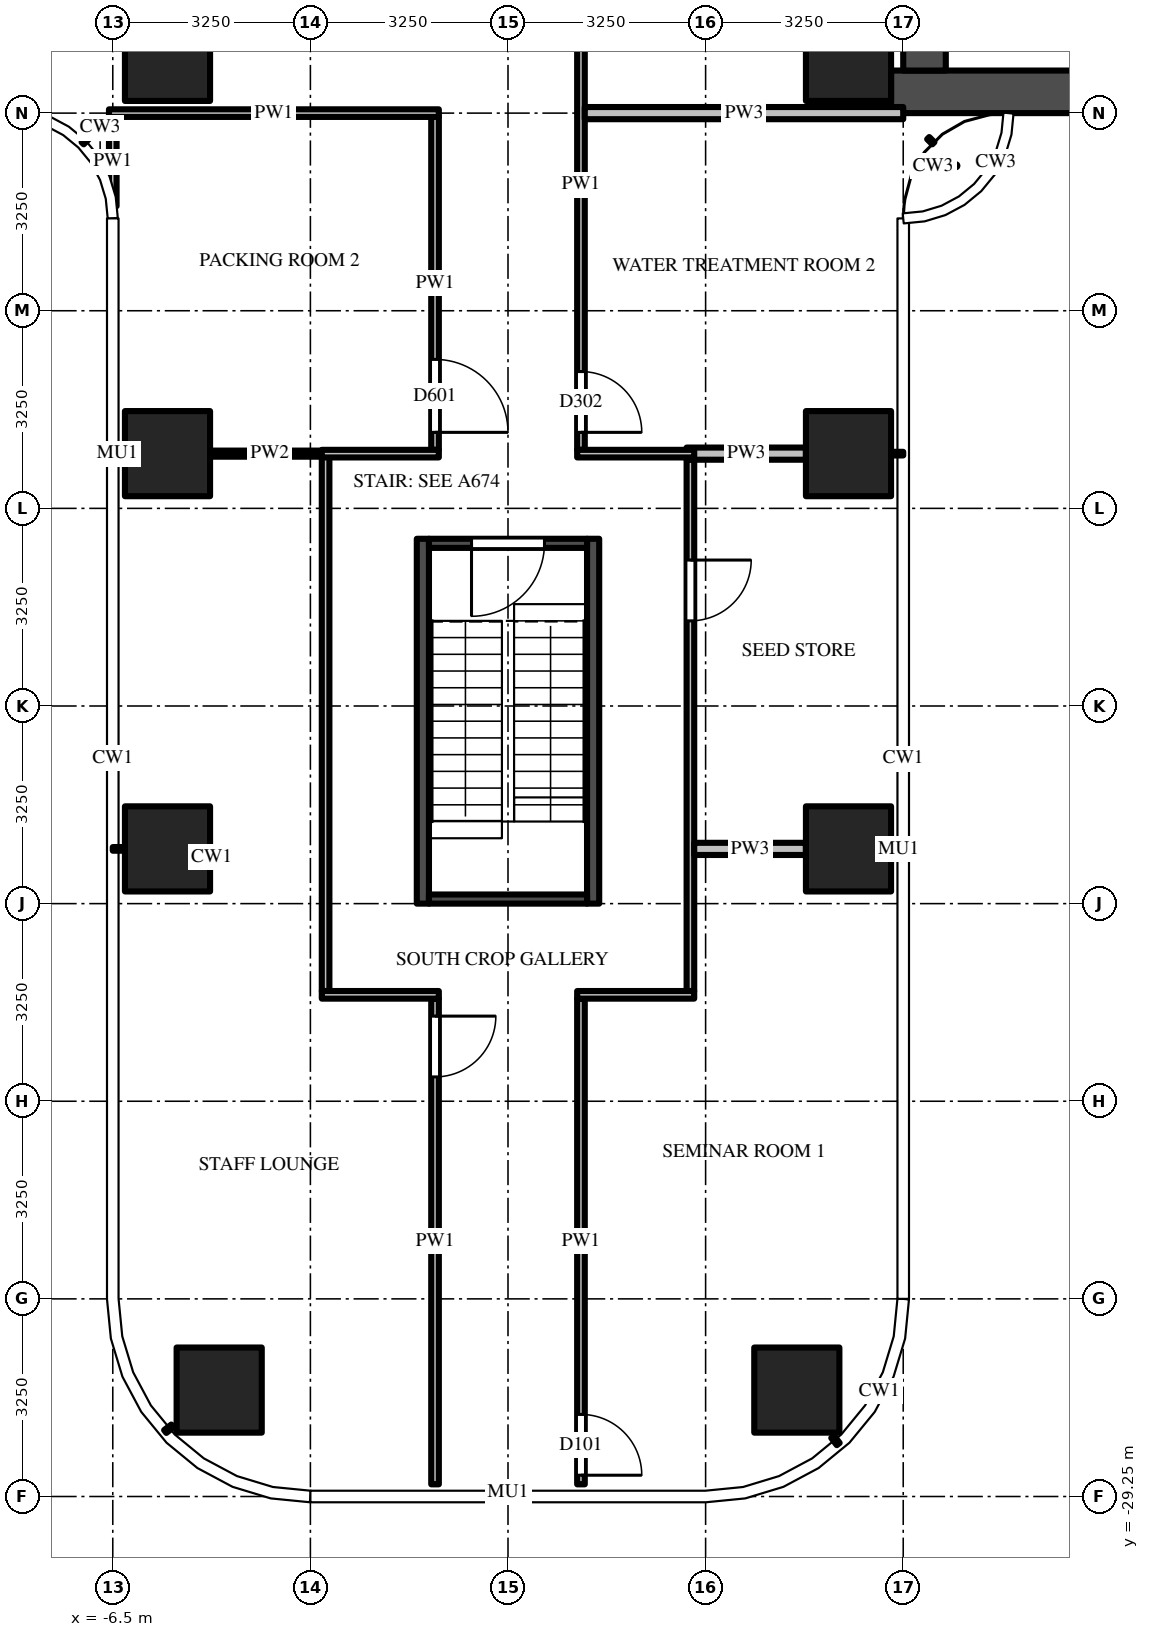
"""IFC4 building model, lengths in metres.
Left out: names, types, materials, properties, quantities, classifications, styles, units other than length and angle.
Written with IfcOpenShell. Run it as: python <this file> out.ifc"""

import sys

from ifc_helpers import new_model, si_unit, direction, frame, frame_2d, origin, origin_2d, place, context, subcontext, project, spatial, polyline, rectangle, outline, extrude, source, transform, mapped, element, fill, save


model = new_model("IFC4")
c1 = context("Model", 3, precision=1e-05, world=origin(), true_north=direction((0.0, 1.0)))
c2 = subcontext(c1, "Body", "Model", "MODEL_VIEW")
j1 = project(units=[si_unit("LENGTHUNIT", "METRE"), si_unit("PLANEANGLEUNIT", "RADIAN")], contexts=[c1])
p1 = place(None, origin())
s1 = spatial("IfcSite", under=j1, at=p1, CompositionType="ELEMENT")
p2 = place(p1, origin())
s2 = spatial("IfcBuilding", under=s1, at=p2, CompositionType="ELEMENT")
p3 = place(p2, frame((0.0, 0.0, 83.5)))
s3 = spatial("IfcBuildingStorey", under=s2, at=p3, CompositionType="ELEMENT", Elevation=83.5)
m1 = source(origin(), c2, "Body", "SweptSolid", [
    extrude(rectangle(XDim=1.4, YDim=1.4, at=origin_2d()), origin(), (0.0, 0.0, 1.0), 4.5),
])
for number, where, z_axis, x_axis in (
    (1, (5.6, -5.6, 0.0), (0.0, 0.0, 1.0), (1.0, 0.0, 0.0)),
    (2, (-5.6, -5.6, 0.0), (0.0, 0.0, 1.0), (1.0, 0.0, 0.0)),
    (3, (5.6, -12.1, 0.0), (0.0, 0.0, 1.0), (1.0, 0.0, 0.0)),
    (4, (5.6, -18.6, 0.0), (0.0, 0.0, 1.0), (1.0, 0.0, 0.0)),
    (5, (4.75, -27.5, 0.0), (0.0, 0.0, 1.0), (1.0, 0.0, 0.0)),
    (6, (-5.6, -12.1, 0.0), (0.0, 0.0, 1.0), (1.0, 0.0, 0.0)),
    (7, (-5.6, -18.6, 0.0), (0.0, 0.0, 1.0), (1.0, 0.0, 0.0)),
    (8, (-4.75, -27.5, 0.0), (0.0, 0.0, 1.0), (1.0, 0.0, 0.0)),
):
    element("IfcColumn", number, at=place(p3, frame(where, z_axis=z_axis, x_axis=x_axis)), inside=s3, PredefinedType="COLUMN", context=c2, shape_type="MappedRepresentation", body=[
        mapped(m1, transform((0.0, 0.0, 0.0))),
    ])
m2 = source(origin(), c2, "Body", "SweptSolid", [
    extrude(rectangle(XDim=16.45, YDim=0.7, at=frame_2d((8.225, 0.0))), origin(), (0.0, 0.0, 1.0), 4.25),
])
p4 = place(p3, frame((6.3, -6.15, 0.0), z_axis=(0.0, 0.0, 1.0), x_axis=(1.0, 0.0, 0.0)))
e9 = element("IfcWall", 9, at=p4, inside=s3, PredefinedType="SHEAR", context=c2, shape_type="MappedRepresentation", body=[
    mapped(m2, transform((0.0, 0.0, 0.0))),
])
m3 = source(origin(), c2, "Body", "SweptSolid", [
    extrude(rectangle(XDim=9.05, YDim=0.7, at=frame_2d((4.525, 0.0))), origin(), (0.0, 0.0, 1.0), 4.25),
])
p5 = place(p3, frame((6.85, -5.8, 0.0), z_axis=(0.0, 0.0, 1.0), x_axis=(0.0, 1.0, 0.0)))
e10 = element("IfcWall", 10, at=p5, inside=s3, PredefinedType="SHEAR", context=c2, shape_type="MappedRepresentation", body=[
    mapped(m3, transform((0.0, 0.0, 0.0))),
])
m4 = source(origin(), c2, "Body", "SweptSolid", [
    extrude(rectangle(XDim=1.8, YDim=2.1, at=frame_2d((0.9, 1.05))), frame((0.0, 0.36, 0.0), z_axis=(0.0, -1.0, 0.0), x_axis=(1.0, 0.0, 0.0)), (0.0, 0.0, 1.0), 0.72),
])
p6 = place(p5, frame((3.15, 0.0, 0.0)))
e11 = element("IfcOpeningElement", 11, at=p6, cuts=e10, PredefinedType="OPENING", context=c2, shape_type="MappedRepresentation", body=[
    mapped(m4, transform((0.0, 0.0, 0.0))),
])
m5 = source(origin(), c2, "Body", "SweptSolid", [
    extrude(rectangle(XDim=6.0, YDim=0.2, at=frame_2d((3.0, 0.0))), origin(), (0.0, 0.0, 1.0), 4.25),
])
for number, where, z_axis, x_axis in (
    (12, (1.4, -13.5, 0.0), (0.0, 0.0, 1.0), (0.0, -1.0, 0.0)),
    (13, (-1.4, -13.5, 0.0), (0.0, 0.0, 1.0), (0.0, -1.0, 0.0)),
):
    element("IfcWall", number, at=place(p3, frame(where, z_axis=z_axis, x_axis=x_axis)), inside=s3, PredefinedType="SHEAR", context=c2, shape_type="MappedRepresentation", body=[
        mapped(m5, transform((0.0, 0.0, 0.0))),
    ])
m6 = source(origin(), c2, "Body", "SweptSolid", [
    extrude(rectangle(XDim=2.6, YDim=0.15, at=frame_2d((1.3, 0.0))), origin(), (0.0, 0.0, 1.0), 4.25),
])
p7 = place(p3, frame((1.3, -13.575, 0.0), z_axis=(0.0, 0.0, 1.0), x_axis=(-1.0, 0.0, 0.0)))
e14 = element("IfcWall", 14, at=p7, inside=s3, PredefinedType="SHEAR", context=c2, shape_type="MappedRepresentation", body=[
    mapped(m6, transform((0.0, 0.0, 0.0))),
])
m7 = source(origin(), c2, "Body", "SweptSolid", [
    extrude(rectangle(XDim=1.2, YDim=2.1, at=frame_2d((0.6, 1.05))), frame((0.0, 0.085, 0.0), z_axis=(0.0, -1.0, 0.0), x_axis=(1.0, 0.0, 0.0)), (0.0, 0.0, 1.0), 0.17),
])
p8 = place(p7, frame((0.7, 0.0, 0.0)))
e15 = element("IfcOpeningElement", 15, at=p8, cuts=e14, PredefinedType="OPENING", context=c2, shape_type="MappedRepresentation", body=[
    mapped(m7, transform((0.0, 0.0, 0.0))),
])
p9 = place(p3, frame((1.3, -19.425, 0.0), z_axis=(0.0, 0.0, 1.0), x_axis=(-1.0, 0.0, 0.0)))
e16 = element("IfcWall", 16, at=p9, inside=s3, PredefinedType="SHEAR", context=c2, shape_type="MappedRepresentation", body=[
    mapped(m6, transform((0.0, 0.0, 0.0))),
])
p10 = place(p3, origin())
e17 = element("IfcWall", 17, at=p10, inside=s3, PredefinedType="USERDEFINED", context=c2, shape_type="SweptSolid", body=[
    extrude(outline(polyline([(8.602, -27.696), (8.025, -28.631), (7.514, -28.316), (8.028, -27.483), (8.233, -26.2), (8.104, -25.438), (8.696, -25.338), (8.841, -26.198), (8.602, -27.696)])), origin(), (0.0, 0.0, 1.0), 0.5),
])
m8 = source(origin(), c2, "Body", "SweptSolid", [
    extrude(rectangle(XDim=1.469, YDim=0.125, at=frame_2d((0.734, 0.0))), origin(), (0.0, 0.0, 1.0), 4.25),
])
p11 = place(p3, frame((-6.5, -6.562, 0.0), z_axis=(0.0, 0.0, 1.0), x_axis=(0.0, -1.0, 0.0)))
e18 = element("IfcWall", 18, at=p11, inside=s3, PredefinedType="PARTITIONING", context=c2, shape_type="MappedRepresentation", body=[
    mapped(m8, transform((0.0, 0.0, 0.0))),
])
m9 = source(origin(), c2, "Body", "SweptSolid", [
    extrude(rectangle(XDim=8.788, YDim=0.125, at=frame_2d((4.394, 0.0))), origin(), (0.0, 0.0, 1.0), 3.468),
])
p12 = place(p3, frame((-3.0, -20.938, 0.0), z_axis=(0.0, 0.0, 1.0), x_axis=(0.0, 1.0, 0.0)))
e19 = element("IfcWall", 19, at=p12, inside=s3, PredefinedType="PARTITIONING", context=c2, shape_type="MappedRepresentation", body=[
    mapped(m9, transform((0.0, 0.0, 0.0))),
])
m10 = source(origin(), c2, "Body", "SweptSolid", [
    extrude(rectangle(XDim=7.988, YDim=0.125, at=frame_2d((3.994, 0.0))), origin(), (0.0, 0.0, 1.0), 3.33),
])
p13 = place(p3, frame((-1.2, -21.062, 0.0), z_axis=(0.0, 0.0, 1.0), x_axis=(0.0, -1.0, 0.0)))
e20 = element("IfcWall", 20, at=p13, inside=s3, PredefinedType="PARTITIONING", context=c2, shape_type="MappedRepresentation", body=[
    mapped(m10, transform((0.0, 0.0, 0.0))),
])
m11 = source(origin(), c2, "Body", "SweptSolid", [
    extrude(rectangle(XDim=1.0, YDim=2.1, at=frame_2d((0.5, 1.05))), frame((0.0, 0.073, 0.0), z_axis=(0.0, -1.0, 0.0), x_axis=(1.0, 0.0, 0.0)), (0.0, 0.0, 1.0), 0.145),
])
p14 = place(p13, frame((0.288, 0.0, 0.0)))
e21 = element("IfcOpeningElement", 21, at=p14, cuts=e20, PredefinedType="OPENING", context=c2, shape_type="MappedRepresentation", body=[
    mapped(m11, transform((0.0, 0.0, 0.0))),
])
m12 = source(origin(), c2, "Body", "SweptSolid", [
    extrude(rectangle(XDim=5.475, YDim=0.125, at=frame_2d((2.738, 0.0))), origin(), (0.0, 0.0, 1.0), 3.468),
])
p15 = place(p3, frame((-1.2, -6.562, 0.0), z_axis=(0.0, 0.0, 1.0), x_axis=(0.0, -1.0, 0.0)))
e22 = element("IfcWall", 22, at=p15, inside=s3, PredefinedType="PARTITIONING", context=c2, shape_type="MappedRepresentation", body=[
    mapped(m12, transform((0.0, 0.0, 0.0))),
])
m13 = source(origin(), c2, "Body", "SweptSolid", [
    extrude(rectangle(XDim=1.2, YDim=2.1, at=frame_2d((0.6, 1.05))), frame((0.0, 0.073, 0.0), z_axis=(0.0, -1.0, 0.0), x_axis=(1.0, 0.0, 0.0)), (0.0, 0.0, 1.0), 0.145),
])
p16 = place(p15, frame((3.988, 0.0, 0.0)))
e23 = element("IfcOpeningElement", 23, at=p16, cuts=e22, PredefinedType="OPENING", context=c2, shape_type="MappedRepresentation", body=[
    mapped(m13, transform((0.0, 0.0, 0.0))),
])
p17 = place(p3, frame((1.2, -21.062, 0.0), z_axis=(0.0, 0.0, 1.0), x_axis=(0.0, -1.0, 0.0)))
e24 = element("IfcWall", 24, at=p17, inside=s3, PredefinedType="PARTITIONING", context=c2, shape_type="MappedRepresentation", body=[
    mapped(m10, transform((0.0, 0.0, 0.0))),
])
p18 = place(p17, frame((6.837, 0.0, 0.0)))
e25 = element("IfcOpeningElement", 25, at=p18, cuts=e24, PredefinedType="OPENING", context=c2, shape_type="MappedRepresentation", body=[
    mapped(m11, transform((0.0, 0.0, 0.0))),
])
m14 = source(origin(), c2, "Body", "SweptSolid", [
    extrude(rectangle(XDim=8.725, YDim=0.125, at=frame_2d((4.363, 0.0))), origin(), (0.0, 0.0, 1.0), 3.468),
])
p19 = place(p3, frame((1.2, -3.312, 0.0), z_axis=(0.0, 0.0, 1.0), x_axis=(0.0, -1.0, 0.0)))
e26 = element("IfcWall", 26, at=p19, inside=s3, PredefinedType="PARTITIONING", context=c2, shape_type="MappedRepresentation", body=[
    mapped(m14, transform((0.0, 0.0, 0.0))),
])
p20 = place(p19, frame((7.438, 0.0, 0.0)))
e27 = element("IfcOpeningElement", 27, at=p20, cuts=e26, PredefinedType="OPENING", context=c2, shape_type="MappedRepresentation", body=[
    mapped(m11, transform((0.0, 0.0, 0.0))),
])
m15 = source(origin(), c2, "Body", "SweptSolid", [
    extrude(rectangle(XDim=8.738, YDim=0.125, at=frame_2d((4.369, 0.0))), origin(), (0.0, 0.0, 1.0), 3.468),
])
p21 = place(p3, frame((3.0, -12.2, 0.0), z_axis=(0.0, 0.0, 1.0), x_axis=(0.0, -1.0, 0.0)))
e28 = element("IfcWall", 28, at=p21, inside=s3, PredefinedType="PARTITIONING", context=c2, shape_type="MappedRepresentation", body=[
    mapped(m15, transform((0.0, 0.0, 0.0))),
])
p22 = place(p21, frame((1.65, 0.0, 0.0)))
e29 = element("IfcOpeningElement", 29, at=p22, cuts=e28, PredefinedType="OPENING", context=c2, shape_type="MappedRepresentation", body=[
    mapped(m11, transform((0.0, 0.0, 0.0))),
])
m16 = source(origin(), c2, "Body", "SweptSolid", [
    extrude(rectangle(XDim=1.925, YDim=0.125, at=frame_2d((0.962, 0.0))), origin(), (0.0, 0.0, 1.0), 4.25),
])
for number, where, z_axis, x_axis in (
    (30, (-1.137, -21.0, 0.0), (0.0, 0.0, 1.0), (-1.0, 0.0, 0.0)),
    (31, (3.062, -21.0, 0.0), (0.0, 0.0, 1.0), (-1.0, 0.0, 0.0)),
):
    element("IfcWall", number, at=place(p3, frame(where, z_axis=z_axis, x_axis=x_axis)), inside=s3, PredefinedType="PARTITIONING", context=c2, shape_type="MappedRepresentation", body=[
        mapped(m16, transform((0.0, 0.0, 0.0))),
    ])
m17 = source(origin(), c2, "Body", "SweptSolid", [
    extrude(rectangle(XDim=1.837, YDim=0.2, at=frame_2d((0.919, 0.0))), origin(), (0.0, 0.0, 1.0), 3.697),
])
p23 = place(p3, frame((3.062, -18.6, 0.0), z_axis=(0.0, 0.0, 1.0), x_axis=(1.0, 0.0, 0.0)))
e32 = element("IfcWall", 32, at=p23, inside=s3, PredefinedType="PARTITIONING", context=c2, shape_type="MappedRepresentation", body=[
    mapped(m17, transform((0.0, 0.0, 0.0))),
])
m18 = source(origin(), c2, "Body", "SweptSolid", [
    extrude(rectangle(XDim=1.962, YDim=0.2, at=frame_2d((0.981, 0.0))), origin(), (0.0, 0.0, 1.0), 3.468),
])
p24 = place(p3, frame((2.938, -12.1, 0.0), z_axis=(0.0, 0.0, 1.0), x_axis=(1.0, 0.0, 0.0)))
e33 = element("IfcWall", 33, at=p24, inside=s3, PredefinedType="PARTITIONING", context=c2, shape_type="MappedRepresentation", body=[
    mapped(m18, transform((0.0, 0.0, 0.0))),
])
m19 = source(origin(), c2, "Body", "SweptSolid", [
    extrude(rectangle(XDim=1.962, YDim=0.1, at=frame_2d((0.981, 0.0))), origin(), (0.0, 0.0, 1.0), 3.468),
])
p25 = place(p3, frame((-4.9, -12.1, 0.0), z_axis=(0.0, 0.0, 1.0), x_axis=(1.0, 0.0, 0.0)))
e34 = element("IfcWall", 34, at=p25, inside=s3, PredefinedType="PARTITIONING", context=c2, shape_type="MappedRepresentation", body=[
    mapped(m19, transform((0.0, 0.0, 0.0))),
])
m20 = source(origin(), c2, "Body", "SweptSolid", [
    extrude(rectangle(XDim=1.925, YDim=0.125, at=frame_2d((0.962, 0.0))), origin(), (0.0, 0.0, 1.0), 3.468),
])
for number, where, z_axis, x_axis in (
    (35, (-3.062, -12.1, 0.0), (0.0, 0.0, 1.0), (1.0, 0.0, 0.0)),
    (36, (1.137, -12.1, 0.0), (0.0, 0.0, 1.0), (1.0, 0.0, 0.0)),
):
    element("IfcWall", number, at=place(p3, frame(where, z_axis=z_axis, x_axis=x_axis)), inside=s3, PredefinedType="PARTITIONING", context=c2, shape_type="MappedRepresentation", body=[
        mapped(m20, transform((0.0, 0.0, 0.0))),
    ])
m21 = source(origin(), c2, "Body", "SweptSolid", [
    extrude(rectangle(XDim=5.238, YDim=0.2, at=frame_2d((2.619, 0.0))), origin(), (0.0, 0.0, 1.0), 3.33),
])
p26 = place(p3, frame((1.262, -6.5, 0.0), z_axis=(0.0, 0.0, 1.0), x_axis=(1.0, 0.0, 0.0)))
e37 = element("IfcWall", 37, at=p26, inside=s3, PredefinedType="PARTITIONING", context=c2, shape_type="MappedRepresentation", body=[
    mapped(m21, transform((0.0, 0.0, 0.0))),
])
m22 = source(origin(), c2, "Body", "SweptSolid", [
    extrude(rectangle(XDim=5.425, YDim=0.125, at=frame_2d((2.712, 0.0))), origin(), (0.0, 0.0, 1.0), 3.33),
])
p27 = place(p3, frame((-1.137, -6.5, 0.0), z_axis=(0.0, 0.0, 1.0), x_axis=(-1.0, 0.0, 0.0)))
e38 = element("IfcWall", 38, at=p27, inside=s3, PredefinedType="PARTITIONING", context=c2, shape_type="MappedRepresentation", body=[
    mapped(m22, transform((0.0, 0.0, 0.0))),
])
m23 = source(origin(), c2, "Body", "SweptSolid", [
    extrude(rectangle(XDim=1.2, YDim=2.1, at=frame_2d((0.6, 1.05))), frame((0.0, 0.025, 0.0), z_axis=(0.0, -1.0, 0.0), x_axis=(1.0, 0.0, 0.0)), (0.0, 0.0, 1.0), 0.05),
])
p28 = place(p8, origin())
e39 = element("IfcDoor", 39, at=p28, inside=s3, OperationType="SINGLE_SWING_RIGHT", PredefinedType="DOOR", context=c2, shape_type="MappedRepresentation", body=[
    mapped(m23, transform((0.0, 0.0, 0.0))),
])
fill(e15, e39)
m24 = source(origin(), c2, "Body", "SweptSolid", [
    extrude(rectangle(XDim=1.0, YDim=2.1, at=frame_2d((0.5, 1.05))), frame((0.0, 0.025, 0.0), z_axis=(0.0, -1.0, 0.0), x_axis=(1.0, 0.0, 0.0)), (0.0, 0.0, 1.0), 0.05),
])
p29 = place(p18, origin())
e40 = element("IfcDoor", 40, at=p29, inside=s3, OperationType="SINGLE_SWING_RIGHT", PredefinedType="DOOR", context=c2, shape_type="MappedRepresentation", body=[
    mapped(m24, transform((0.0, 0.0, 0.0))),
])
fill(e25, e40)
p30 = place(p14, origin())
e41 = element("IfcDoor", 41, at=p30, inside=s3, OperationType="SINGLE_SWING_LEFT", PredefinedType="DOOR", context=c2, shape_type="MappedRepresentation", body=[
    mapped(m24, transform((0.0, 0.0, 0.0))),
])
fill(e21, e41)
p31 = place(p22, origin())
e42 = element("IfcDoor", 42, at=p31, inside=s3, OperationType="SINGLE_SWING_LEFT", PredefinedType="DOOR", context=c2, shape_type="MappedRepresentation", body=[
    mapped(m24, transform((0.0, 0.0, 0.0))),
])
fill(e29, e42)
p32 = place(p20, origin())
e43 = element("IfcDoor", 43, at=p32, inside=s3, OperationType="SINGLE_SWING_RIGHT", PredefinedType="DOOR", context=c2, shape_type="MappedRepresentation", body=[
    mapped(m24, transform((0.0, 0.0, 0.0))),
])
fill(e27, e43)
p33 = place(p16, origin())
e44 = element("IfcDoor", 44, at=p33, inside=s3, OperationType="SINGLE_SWING_RIGHT", PredefinedType="DOOR", context=c2, shape_type="MappedRepresentation", body=[
    mapped(m23, transform((0.0, 0.0, 0.0))),
])
fill(e23, e44)
save(model, sys.argv[1])
